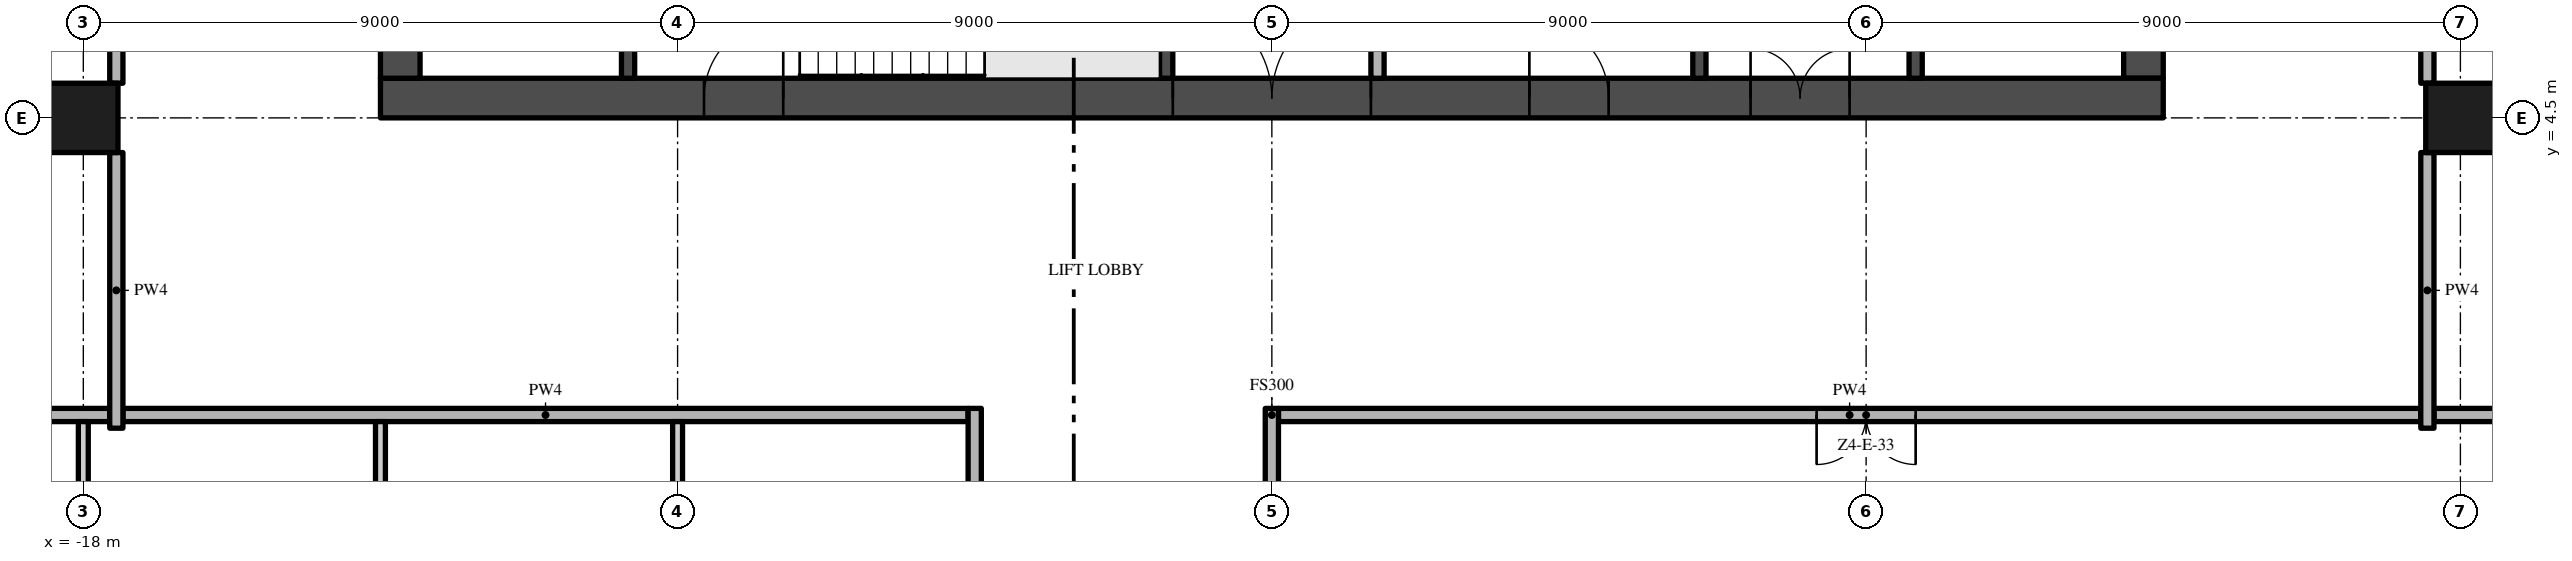
"""IFC4 building model, lengths in metres.
Left out: names, types, materials, properties, quantities, classifications, styles, units other than length and angle.
Written with IfcOpenShell. Run it as: python <this file> out.ifc"""

import sys

from ifc_helpers import new_model, si_unit, direction, frame, frame_2d, origin, origin_2d, place, context, subcontext, project, spatial, rectangle, extrude, element, fill, save


model = new_model("IFC4")
c1 = context("Model", 3, precision=1e-05, world=origin(), true_north=direction((0.0, 1.0)))
c2 = subcontext(c1, "Body", "Model", "MODEL_VIEW")
j1 = project(units=[si_unit("LENGTHUNIT", "METRE"), si_unit("PLANEANGLEUNIT", "RADIAN")], contexts=[c1])
p1 = place(None, origin())
s1 = spatial("IfcSite", under=j1, at=p1, CompositionType="ELEMENT")
p2 = place(p1, origin())
s2 = spatial("IfcBuilding", under=s1, at=p2, CompositionType="ELEMENT")
p3 = place(p2, frame((0.0, 0.0, 226.2)))
s3 = spatial("IfcBuildingStorey", under=s2, at=p3, CompositionType="ELEMENT", Elevation=226.2)
p4 = place(p3, frame((-13.5, 4.8, -0.3), z_axis=(0.0, 0.0, 1.0), x_axis=(1.0, 0.0, 0.0)))
e1 = element("IfcWall", 1, at=p4, inside=s3, PredefinedType="SHEAR", context=c2, shape_type="SweptSolid", body=[
    extrude(rectangle(XDim=27.0, YDim=0.6, at=frame_2d((13.5, 0.0))), origin(), (0.0, 0.0, 1.0), 3.8),
])
p5 = place(p4, frame((12.0, 0.0, 0.3)))
e2 = element("IfcOpeningElement", 2, at=p5, cuts=e1, PredefinedType="OPENING", context=c2, shape_type="SweptSolid", body=[
    extrude(rectangle(XDim=3.0, YDim=2.4, at=frame_2d((1.5, 1.2))), frame((0.0, 0.31, 0.0), z_axis=(0.0, -1.0, 0.0), x_axis=(1.0, 0.0, 0.0)), (0.0, 0.0, 1.0), 0.62),
])
p6 = place(p4, frame((4.9, 0.0, 0.3)))
e3 = element("IfcOpeningElement", 3, at=p6, cuts=e1, PredefinedType="OPENING", context=c2, shape_type="SweptSolid", body=[
    extrude(rectangle(XDim=1.2, YDim=2.2, at=frame_2d((0.6, 1.1))), frame((0.0, 0.31, 0.0), z_axis=(0.0, -1.0, 0.0), x_axis=(1.0, 0.0, 0.0)), (0.0, 0.0, 1.0), 0.62),
])
p7 = place(p4, frame((20.75, 0.0, 0.3)))
e4 = element("IfcOpeningElement", 4, at=p7, cuts=e1, PredefinedType="OPENING", context=c2, shape_type="SweptSolid", body=[
    extrude(rectangle(XDim=1.5, YDim=2.2, at=frame_2d((0.75, 1.1))), frame((0.0, 0.31, 0.0), z_axis=(0.0, -1.0, 0.0), x_axis=(1.0, 0.0, 0.0)), (0.0, 0.0, 1.0), 0.62),
])
p8 = place(p4, frame((17.4, 0.0, 0.3)))
e5 = element("IfcOpeningElement", 5, at=p8, cuts=e1, PredefinedType="OPENING", context=c2, shape_type="SweptSolid", body=[
    extrude(rectangle(XDim=1.2, YDim=2.2, at=frame_2d((0.6, 1.1))), frame((0.0, 0.31, 0.0), z_axis=(0.0, -1.0, 0.0), x_axis=(1.0, 0.0, 0.0)), (0.0, 0.0, 1.0), 0.62),
])
p9 = place(p3, frame((13.2, 5.1, -0.3), z_axis=(0.0, 0.0, 1.0), x_axis=(0.0, 1.0, 0.0)))
e6 = element("IfcWall", 6, at=p9, inside=s3, PredefinedType="SHEAR", context=c2, shape_type="SweptSolid", body=[
    extrude(rectangle(XDim=16.8, YDim=0.6, at=frame_2d((8.4, 0.0))), origin(), (0.0, 0.0, 1.0), 3.8),
])
p10 = place(p9, frame((6.3, 0.0, 0.3)))
e7 = element("IfcOpeningElement", 7, at=p10, cuts=e6, PredefinedType="OPENING", context=c2, shape_type="SweptSolid", body=[
    extrude(rectangle(XDim=1.2, YDim=2.2, at=frame_2d((0.6, 1.1))), frame((0.0, 0.31, 0.0), z_axis=(0.0, -1.0, 0.0), x_axis=(1.0, 0.0, 0.0)), (0.0, 0.0, 1.0), 0.62),
])
p11 = place(p3, frame((-13.2, 21.9, -0.3), z_axis=(0.0, 0.0, 1.0), x_axis=(0.0, -1.0, 0.0)))
e8 = element("IfcWall", 8, at=p11, inside=s3, PredefinedType="SHEAR", context=c2, shape_type="SweptSolid", body=[
    extrude(rectangle(XDim=16.8, YDim=0.6, at=frame_2d((8.4, 0.0))), origin(), (0.0, 0.0, 1.0), 3.8),
])
p12 = place(p11, frame((9.3, 0.0, 0.3)))
e9 = element("IfcOpeningElement", 9, at=p12, cuts=e8, PredefinedType="OPENING", context=c2, shape_type="SweptSolid", body=[
    extrude(rectangle(XDim=1.2, YDim=2.2, at=frame_2d((0.6, 1.1))), frame((0.0, 0.31, 0.0), z_axis=(0.0, -1.0, 0.0), x_axis=(1.0, 0.0, 0.0)), (0.0, 0.0, 1.0), 0.62),
])
for number, where, z_axis, x_axis in (
    (10, (-18.0, 4.5, 0.0), (0.0, 0.0, 1.0), (1.0, 0.0, 0.0)),
    (11, (18.0, 4.5, 0.0), (0.0, 0.0, 1.0), (1.0, 0.0, 0.0)),
):
    element("IfcColumn", number, at=place(p3, frame(where, z_axis=z_axis, x_axis=x_axis)), inside=s3, PredefinedType="COLUMN", context=c2, shape_type="SweptSolid", body=[
        extrude(rectangle(XDim=1.05, YDim=1.05, at=origin_2d()), origin(), (0.0, 0.0, 1.0), 3.5),
    ])
for number, where, z_axis, x_axis in (
    (12, (-9.75, 5.1, 0.0), (0.0, 0.0, 1.0), (0.0, 1.0, 0.0)),
    (13, (-1.6, 5.1, 0.0), (0.0, 0.0, 1.0), (0.0, 1.0, 0.0)),
):
    element("IfcWall", number, at=place(p3, frame(where, z_axis=z_axis, x_axis=x_axis)), inside=s3, PredefinedType="SHEAR", context=c2, shape_type="SweptSolid", body=[
        extrude(rectangle(XDim=2.85, YDim=0.2, at=frame_2d((1.425, 0.0))), origin(), (0.0, 0.0, 1.0), 3.5),
    ])
p13 = place(p3, frame((1.6, 7.5, 0.0), z_axis=(0.0, 0.0, 1.0), x_axis=(0.0, -1.0, 0.0)))
e14 = element("IfcWall", 14, at=p13, inside=s3, PredefinedType="PARTITIONING", context=c2, shape_type="SweptSolid", body=[
    extrude(rectangle(XDim=2.4, YDim=0.2, at=frame_2d((1.2, 0.0))), origin(), (0.0, 0.0, 1.0), 3.5),
])
p14 = place(p13, frame((0.35, 0.0, 0.0)))
e15 = element("IfcOpeningElement", 15, at=p14, cuts=e14, PredefinedType="OPENING", context=c2, shape_type="SweptSolid", body=[
    extrude(rectangle(XDim=0.9, YDim=2.1, at=frame_2d((0.45, 1.05))), frame((0.0, 0.11, 0.0), z_axis=(0.0, -1.0, 0.0), x_axis=(1.0, 0.0, 0.0)), (0.0, 0.0, 1.0), 0.22),
])
p15 = place(p3, frame((6.475, 5.1, 0.0), z_axis=(0.0, 0.0, 1.0), x_axis=(0.0, 1.0, 0.0)))
e16 = element("IfcWall", 16, at=p15, inside=s3, PredefinedType="SHEAR", context=c2, shape_type="SweptSolid", body=[
    extrude(rectangle(XDim=2.4, YDim=0.2, at=frame_2d((1.2, 0.0))), origin(), (0.0, 0.0, 1.0), 3.5),
])
p16 = place(p3, frame((9.75, 5.1, 0.0), z_axis=(0.0, 0.0, 1.0), x_axis=(0.0, 1.0, 0.0)))
e17 = element("IfcWall", 17, at=p16, inside=s3, PredefinedType="SHEAR", context=c2, shape_type="SweptSolid", body=[
    extrude(rectangle(XDim=2.5, YDim=0.2, at=frame_2d((1.25, 0.0))), origin(), (0.0, 0.0, 1.0), 3.5),
])
p17 = place(p16, frame((0.85, 0.0, 0.0)))
e18 = element("IfcOpeningElement", 18, at=p17, cuts=e17, PredefinedType="OPENING", context=c2, shape_type="SweptSolid", body=[
    extrude(rectangle(XDim=1.1, YDim=2.1, at=frame_2d((0.55, 1.05))), frame((0.0, 0.11, 0.0), z_axis=(0.0, -1.0, 0.0), x_axis=(1.0, 0.0, 0.0)), (0.0, 0.0, 1.0), 0.22),
])
p18 = place(p3, frame((-17.4, 0.0, 0.0), z_axis=(0.0, 0.0, 1.0), x_axis=(1.0, 0.0, 0.0)))
e19 = element("IfcWall", 19, at=p18, inside=s3, PredefinedType="PARTITIONING", context=c2, shape_type="SweptSolid", body=[
    extrude(rectangle(XDim=12.8, YDim=0.2, at=frame_2d((6.4, 0.0))), origin(), (0.0, 0.0, 1.0), 3.5),
])
p19 = place(p3, frame((17.4, 0.0, 0.0), z_axis=(0.0, 0.0, 1.0), x_axis=(-1.0, 0.0, 0.0)))
e20 = element("IfcWall", 20, at=p19, inside=s3, PredefinedType="PARTITIONING", context=c2, shape_type="SweptSolid", body=[
    extrude(rectangle(XDim=17.3, YDim=0.2, at=frame_2d((8.65, 0.0))), origin(), (0.0, 0.0, 1.0), 3.5),
])
p20 = place(p19, frame((7.65, 0.0, 0.0)))
e21 = element("IfcOpeningElement", 21, at=p20, cuts=e20, PredefinedType="OPENING", context=c2, shape_type="SweptSolid", body=[
    extrude(rectangle(XDim=1.5, YDim=2.4, at=frame_2d((0.75, 1.2))), frame((0.0, 0.11, 0.0), z_axis=(0.0, -1.0, 0.0), x_axis=(1.0, 0.0, 0.0)), (0.0, 0.0, 1.0), 0.22),
])
for number, where, z_axis, x_axis in (
    (22, (-26.7, 0.0, 0.0), (0.0, 0.0, 1.0), (1.0, 0.0, 0.0)),
    (23, (17.6, 0.0, 0.0), (0.0, 0.0, 1.0), (1.0, 0.0, 0.0)),
):
    element("IfcWall", number, at=place(p3, frame(where, z_axis=z_axis, x_axis=x_axis)), inside=s3, PredefinedType="PARTITIONING", context=c2, shape_type="SweptSolid", body=[
        extrude(rectangle(XDim=9.1, YDim=0.2, at=frame_2d((4.55, 0.0))), origin(), (0.0, 0.0, 1.0), 3.5),
    ])
p21 = place(p3, frame((-18.0, -3.975, 0.0), z_axis=(0.0, 0.0, 1.0), x_axis=(0.0, 1.0, 0.0)))
e24 = element("IfcWall", 24, at=p21, inside=s3, PredefinedType="PARTITIONING", context=c2, shape_type="SweptSolid", body=[
    extrude(rectangle(XDim=3.875, YDim=0.15, at=frame_2d((1.938, 0.0))), origin(), (0.0, 0.0, 1.0), 3.5),
])
p22 = place(p21, frame((0.15, 0.0, 0.0)))
e25 = element("IfcOpeningElement", 25, at=p22, cuts=e24, PredefinedType="OPENING", context=c2, shape_type="SweptSolid", body=[
    extrude(rectangle(XDim=1.0, YDim=2.4, at=frame_2d((0.5, 1.2))), frame((0.0, 0.085, 0.0), z_axis=(0.0, -1.0, 0.0), x_axis=(1.0, 0.0, 0.0)), (0.0, 0.0, 1.0), 0.17),
])
p23 = place(p3, frame((-17.5, -0.2, 0.0), z_axis=(0.0, 0.0, 1.0), x_axis=(0.0, 1.0, 0.0)))
e26 = element("IfcWall", 26, at=p23, inside=s3, PredefinedType="PARTITIONING", context=c2, shape_type="SweptSolid", body=[
    extrude(rectangle(XDim=4.175, YDim=0.2, at=frame_2d((2.087, 0.0))), origin(), (0.0, 0.0, 1.0), 3.5),
])
p24 = place(p3, frame((-17.5, 5.025, 0.0), z_axis=(0.0, 0.0, 1.0), x_axis=(0.0, 1.0, 0.0)))
e27 = element("IfcWall", 27, at=p24, inside=s3, PredefinedType="PARTITIONING", context=c2, shape_type="SweptSolid", body=[
    extrude(rectangle(XDim=7.95, YDim=0.2, at=frame_2d((3.975, 0.0))), origin(), (0.0, 0.0, 1.0), 3.5),
])
p25 = place(p3, frame((-13.5, -0.1, 0.0), z_axis=(0.0, 0.0, 1.0), x_axis=(0.0, -1.0, 0.0)))
e28 = element("IfcWall", 28, at=p25, inside=s3, PredefinedType="PARTITIONING", context=c2, shape_type="SweptSolid", body=[
    extrude(rectangle(XDim=8.525, YDim=0.15, at=frame_2d((4.263, 0.0))), origin(), (0.0, 0.0, 1.0), 3.5),
])
p26 = place(p25, frame((4.0, 0.0, 0.0)))
e29 = element("IfcOpeningElement", 29, at=p26, cuts=e28, PredefinedType="OPENING", context=c2, shape_type="SweptSolid", body=[
    extrude(rectangle(XDim=0.8, YDim=2.0, at=frame_2d((0.4, 1.0))), frame((0.0, 0.085, 0.0), z_axis=(0.0, -1.0, 0.0), x_axis=(1.0, 0.0, 0.0)), (0.0, 0.0, 1.0), 0.17),
])
p27 = place(p3, frame((-9.0, -3.975, 0.0), z_axis=(0.0, 0.0, 1.0), x_axis=(0.0, 1.0, 0.0)))
e30 = element("IfcWall", 30, at=p27, inside=s3, PredefinedType="PARTITIONING", context=c2, shape_type="SweptSolid", body=[
    extrude(rectangle(XDim=3.875, YDim=0.15, at=frame_2d((1.938, 0.0))), origin(), (0.0, 0.0, 1.0), 3.5),
])
p28 = place(p27, frame((2.025, 0.0, 0.0)))
e31 = element("IfcOpeningElement", 31, at=p28, cuts=e30, PredefinedType="OPENING", context=c2, shape_type="SweptSolid", body=[
    extrude(rectangle(XDim=0.9, YDim=2.1, at=frame_2d((0.45, 1.05))), frame((0.0, 0.085, 0.0), z_axis=(0.0, -1.0, 0.0), x_axis=(1.0, 0.0, 0.0)), (0.0, 0.0, 1.0), 0.17),
])
p29 = place(p3, frame((-4.5, -22.2, 0.0), z_axis=(0.0, 0.0, 1.0), x_axis=(0.0, 1.0, 0.0)))
e32 = element("IfcWall", 32, at=p29, inside=s3, PredefinedType="PARTITIONING", context=c2, shape_type="SweptSolid", body=[
    extrude(rectangle(XDim=22.3, YDim=0.2, at=frame_2d((11.15, 0.0))), origin(), (0.0, 0.0, 1.0), 3.5),
])
p30 = place(p29, frame((10.2, 0.0, 0.0)))
e33 = element("IfcOpeningElement", 33, at=p30, cuts=e32, PredefinedType="OPENING", context=c2, shape_type="SweptSolid", body=[
    extrude(rectangle(XDim=1.5, YDim=2.4, at=frame_2d((0.75, 1.2))), frame((0.0, 0.11, 0.0), z_axis=(0.0, -1.0, 0.0), x_axis=(1.0, 0.0, 0.0)), (0.0, 0.0, 1.0), 0.22),
])
p31 = place(p3, frame((0.0, -3.975, 0.0), z_axis=(0.0, 0.0, 1.0), x_axis=(0.0, 1.0, 0.0)))
e34 = element("IfcWall", 34, at=p31, inside=s3, PredefinedType="PARTITIONING", context=c2, shape_type="SweptSolid", body=[
    extrude(rectangle(XDim=4.075, YDim=0.2, at=frame_2d((2.038, 0.0))), origin(), (0.0, 0.0, 1.0), 3.5),
])
p32 = place(p3, frame((17.5, -0.2, 0.0), z_axis=(0.0, 0.0, 1.0), x_axis=(0.0, 1.0, 0.0)))
e35 = element("IfcWall", 35, at=p32, inside=s3, PredefinedType="PARTITIONING", context=c2, shape_type="SweptSolid", body=[
    extrude(rectangle(XDim=4.175, YDim=0.2, at=frame_2d((2.087, 0.0))), origin(), (0.0, 0.0, 1.0), 3.5),
])
p33 = place(p3, frame((17.5, 5.025, 0.0), z_axis=(0.0, 0.0, 1.0), x_axis=(0.0, 1.0, 0.0)))
e36 = element("IfcWall", 36, at=p33, inside=s3, PredefinedType="PARTITIONING", context=c2, shape_type="SweptSolid", body=[
    extrude(rectangle(XDim=7.95, YDim=0.2, at=frame_2d((3.975, 0.0))), origin(), (0.0, 0.0, 1.0), 3.5),
])
p34 = place(p5, frame((3.0, 0.0, 0.0), z_axis=(0.0, 0.0, 1.0), x_axis=(-1.0, 0.0, 0.0)))
e37 = element("IfcDoor", 37, at=p34, inside=s3, OperationType="DOUBLE_DOOR_SINGLE_SWING", PredefinedType="DOOR", context=c2, shape_type="SweptSolid", body=[
    extrude(rectangle(XDim=3.0, YDim=2.4, at=frame_2d((1.5, 1.2))), frame((0.0, 0.025, 0.0), z_axis=(0.0, -1.0, 0.0), x_axis=(1.0, 0.0, 0.0)), (0.0, 0.0, 1.0), 0.05),
])
fill(e2, e37)
p35 = place(p6, frame((1.2, 0.0, 0.0), z_axis=(0.0, 0.0, 1.0), x_axis=(-1.0, 0.0, 0.0)))
e38 = element("IfcDoor", 38, at=p35, inside=s3, OperationType="SINGLE_SWING_LEFT", PredefinedType="DOOR", context=c2, shape_type="SweptSolid", body=[
    extrude(rectangle(XDim=1.2, YDim=2.2, at=frame_2d((0.6, 1.1))), frame((0.0, 0.025, 0.0), z_axis=(0.0, -1.0, 0.0), x_axis=(1.0, 0.0, 0.0)), (0.0, 0.0, 1.0), 0.05),
])
fill(e3, e38)
p36 = place(p7, frame((1.5, 0.0, 0.0), z_axis=(0.0, 0.0, 1.0), x_axis=(-1.0, 0.0, 0.0)))
e39 = element("IfcDoor", 39, at=p36, inside=s3, OperationType="DOUBLE_DOOR_SINGLE_SWING", PredefinedType="DOOR", context=c2, shape_type="SweptSolid", body=[
    extrude(rectangle(XDim=1.5, YDim=2.2, at=frame_2d((0.75, 1.1))), frame((0.0, 0.025, 0.0), z_axis=(0.0, -1.0, 0.0), x_axis=(1.0, 0.0, 0.0)), (0.0, 0.0, 1.0), 0.05),
])
fill(e4, e39)
p37 = place(p8, frame((1.2, 0.0, 0.0), z_axis=(0.0, 0.0, 1.0), x_axis=(-1.0, 0.0, 0.0)))
e40 = element("IfcDoor", 40, at=p37, inside=s3, OperationType="SINGLE_SWING_RIGHT", PredefinedType="DOOR", context=c2, shape_type="SweptSolid", body=[
    extrude(rectangle(XDim=1.2, YDim=2.2, at=frame_2d((0.6, 1.1))), frame((0.0, 0.025, 0.0), z_axis=(0.0, -1.0, 0.0), x_axis=(1.0, 0.0, 0.0)), (0.0, 0.0, 1.0), 0.05),
])
fill(e5, e40)
p38 = place(p20, origin())
e41 = element("IfcDoor", 41, at=p38, inside=s3, OperationType="DOUBLE_DOOR_SINGLE_SWING", PredefinedType="DOOR", context=c2, shape_type="SweptSolid", body=[
    extrude(rectangle(XDim=1.5, YDim=2.4, at=frame_2d((0.75, 1.2))), frame((0.0, 0.025, 0.0), z_axis=(0.0, -1.0, 0.0), x_axis=(1.0, 0.0, 0.0)), (0.0, 0.0, 1.0), 0.05),
])
fill(e21, e41)
save(model, sys.argv[1])
